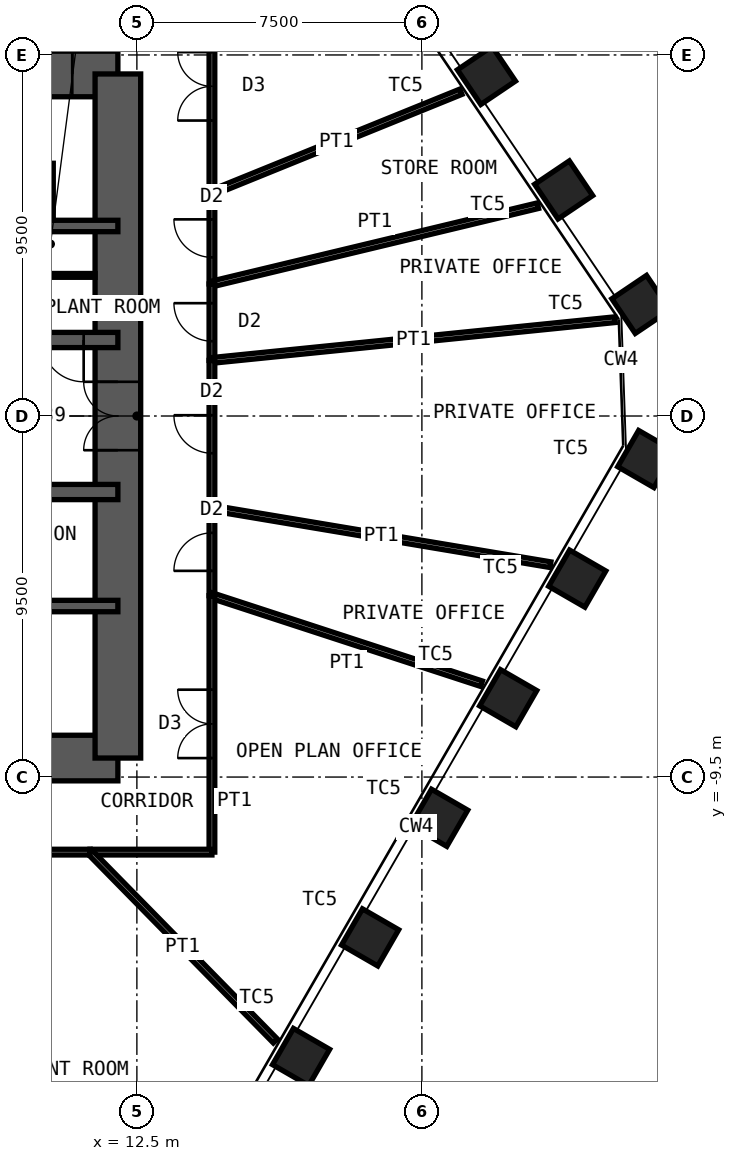
"""IFC4 building model, lengths in metres.
Left out: names, types, materials, properties, quantities, classifications, styles, units other than length and angle.
Written with IfcOpenShell. Run it as: python <this file> out.ifc"""

import sys

from ifc_helpers import new_model, si_unit, direction, frame, frame_2d, origin, origin_2d, place, context, subcontext, project, spatial, rectangle, hollow_rectangle, extrude, element, fill, save


model = new_model("IFC4")
c1 = context("Model", 3, precision=1e-05, world=origin(), true_north=direction((0.0, 1.0)))
c2 = subcontext(c1, "Body", "Model", "MODEL_VIEW")
j1 = project(units=[si_unit("LENGTHUNIT", "METRE"), si_unit("PLANEANGLEUNIT", "RADIAN")], contexts=[c1])
p1 = place(None, origin())
s1 = spatial("IfcSite", under=j1, at=p1, CompositionType="ELEMENT")
p2 = place(p1, origin())
s2 = spatial("IfcBuilding", under=s1, at=p2, CompositionType="ELEMENT")
p3 = place(p2, frame((0.0, 0.0, 205.6)))
s3 = spatial("IfcBuildingStorey", under=s2, at=p3, CompositionType="ELEMENT", Elevation=205.6)
for number, where, z_axis, x_axis in (
    (1, (21.699, 8.961, 0.0), (0.0, 0.0, 1.0), (-0.559, 0.829, 0.0)),
    (2, (23.731, 5.948, 0.0), (0.0, 0.0, 1.0), (-0.559, 0.829, 0.0)),
    (3, (25.762, 2.936, 0.0), (0.0, 0.0, 1.0), (-0.559, 0.829, 0.0)),
    (4, (25.905, -1.132, 0.0), (0.0, 0.0, 1.0), (0.5, 0.866, 0.0)),
    (5, (24.088, -4.279, 0.0), (0.0, 0.0, 1.0), (0.5, 0.866, 0.0)),
    (6, (22.271, -7.426, 0.0), (0.0, 0.0, 1.0), (0.5, 0.866, 0.0)),
    (7, (20.454, -10.572, 0.0), (0.0, 0.0, 1.0), (0.5, 0.866, 0.0)),
    (8, (18.637, -13.719, 0.0), (0.0, 0.0, 1.0), (0.5, 0.866, 0.0)),
    (9, (16.821, -16.866, 0.0), (0.0, 0.0, 1.0), (0.5, 0.866, 0.0)),
):
    element("IfcColumn", number, at=place(p3, frame(where, z_axis=z_axis, x_axis=x_axis)), inside=s3, PredefinedType="COLUMN", context=c2, shape_type="SweptSolid", body=[
        extrude(hollow_rectangle(XDim=1.1, YDim=1.1, WallThickness=0.07, at=origin_2d()), origin(), (0.0, 0.0, 1.0), 4.2),
    ])
p4 = place(p3, frame((-12.0, 9.0, 0.0), z_axis=(0.0, 0.0, 1.0), x_axis=(1.0, 0.0, 0.0)))
e10 = element("IfcWall", 10, at=p4, inside=s3, PredefinedType="SHEAR", context=c2, shape_type="SweptSolid", body=[
    extrude(rectangle(XDim=24.0, YDim=1.2, at=frame_2d((12.0, 0.0))), origin(), (0.0, 0.0, 1.0), 4.2),
])
p5 = place(p4, frame((10.4, 0.0, 0.0)))
e11 = element("IfcOpeningElement", 11, at=p5, cuts=e10, PredefinedType="OPENING", context=c2, shape_type="SweptSolid", body=[
    extrude(rectangle(XDim=1.0, YDim=2.1, at=frame_2d((0.5, 1.05))), frame((0.0, 0.61, 0.0), z_axis=(0.0, -1.0, 0.0), x_axis=(1.0, 0.0, 0.0)), (0.0, 0.0, 1.0), 1.22),
])
p6 = place(p4, frame((17.6, 0.0, 0.0)))
e12 = element("IfcOpeningElement", 12, at=p6, cuts=e10, PredefinedType="OPENING", context=c2, shape_type="SweptSolid", body=[
    extrude(rectangle(XDim=0.9, YDim=2.1, at=frame_2d((0.45, 1.05))), frame((0.0, 0.61, 0.0), z_axis=(0.0, -1.0, 0.0), x_axis=(1.0, 0.0, 0.0)), (0.0, 0.0, 1.0), 1.22),
])
p7 = place(p4, frame((21.9, 0.0, 0.0)))
e13 = element("IfcOpeningElement", 13, at=p7, cuts=e10, PredefinedType="OPENING", context=c2, shape_type="SweptSolid", body=[
    extrude(rectangle(XDim=0.9, YDim=2.1, at=frame_2d((0.45, 1.05))), frame((0.0, 0.61, 0.0), z_axis=(0.0, -1.0, 0.0), x_axis=(1.0, 0.0, 0.0)), (0.0, 0.0, 1.0), 1.22),
])
p8 = place(p3, frame((-12.0, -9.0, 0.0), z_axis=(0.0, 0.0, 1.0), x_axis=(1.0, 0.0, 0.0)))
e14 = element("IfcWall", 14, at=p8, inside=s3, PredefinedType="SHEAR", context=c2, shape_type="SweptSolid", body=[
    extrude(rectangle(XDim=24.0, YDim=1.2, at=frame_2d((12.0, 0.0))), origin(), (0.0, 0.0, 1.0), 4.2),
])
p9 = place(p8, frame((1.35, 0.0, 0.0)))
e15 = element("IfcOpeningElement", 15, at=p9, cuts=e14, PredefinedType="OPENING", context=c2, shape_type="SweptSolid", body=[
    extrude(rectangle(XDim=1.0, YDim=2.1, at=frame_2d((0.5, 1.05))), frame((0.0, 0.61, 0.0), z_axis=(0.0, -1.0, 0.0), x_axis=(1.0, 0.0, 0.0)), (0.0, 0.0, 1.0), 1.22),
])
p10 = place(p8, frame((5.325, 0.0, 0.0)))
e16 = element("IfcOpeningElement", 16, at=p10, cuts=e14, PredefinedType="OPENING", context=c2, shape_type="SweptSolid", body=[
    extrude(rectangle(XDim=1.15, YDim=2.1, at=frame_2d((0.575, 1.05))), frame((0.0, 0.61, 0.0), z_axis=(0.0, -1.0, 0.0), x_axis=(1.0, 0.0, 0.0)), (0.0, 0.0, 1.0), 1.22),
])
p11 = place(p8, frame((12.6, 0.0, 0.0)))
e17 = element("IfcOpeningElement", 17, at=p11, cuts=e14, PredefinedType="OPENING", context=c2, shape_type="SweptSolid", body=[
    extrude(rectangle(XDim=1.0, YDim=2.1, at=frame_2d((0.5, 1.05))), frame((0.0, 0.61, 0.0), z_axis=(0.0, -1.0, 0.0), x_axis=(1.0, 0.0, 0.0)), (0.0, 0.0, 1.0), 1.22),
])
p12 = place(p3, frame((12.0, -9.0, 0.0), z_axis=(0.0, 0.0, 1.0), x_axis=(0.0, 1.0, 0.0)))
e18 = element("IfcWall", 18, at=p12, inside=s3, PredefinedType="SHEAR", context=c2, shape_type="SweptSolid", body=[
    extrude(rectangle(XDim=18.0, YDim=1.2, at=frame_2d((9.0, 0.0))), origin(), (0.0, 0.0, 1.0), 4.2),
])
p13 = place(p12, frame((8.1, 0.0, 0.0)))
e19 = element("IfcOpeningElement", 19, at=p13, cuts=e18, PredefinedType="OPENING", context=c2, shape_type="SweptSolid", body=[
    extrude(rectangle(XDim=1.8, YDim=2.1, at=frame_2d((0.9, 1.05))), frame((0.0, 0.61, 0.0), z_axis=(0.0, -1.0, 0.0), x_axis=(1.0, 0.0, 0.0)), (0.0, 0.0, 1.0), 1.22),
])
p14 = place(p3, frame((-12.0, 5.0, 0.0), z_axis=(0.0, 0.0, 1.0), x_axis=(1.0, 0.0, 0.0)))
e20 = element("IfcWall", 20, at=p14, inside=s3, PredefinedType="SHEAR", context=c2, shape_type="SweptSolid", body=[
    extrude(rectangle(XDim=24.0, YDim=0.3, at=frame_2d((12.0, 0.0))), origin(), (0.0, 0.0, 1.0), 4.2),
])
p15 = place(p3, frame((-12.0, 2.0, 0.0), z_axis=(0.0, 0.0, 1.0), x_axis=(1.0, 0.0, 0.0)))
e21 = element("IfcWall", 21, at=p15, inside=s3, PredefinedType="SHEAR", context=c2, shape_type="SweptSolid", body=[
    extrude(rectangle(XDim=24.0, YDim=0.4, at=frame_2d((12.0, 0.0))), origin(), (0.0, 0.0, 1.0), 4.2),
])
p16 = place(p15, frame((2.4, 0.0, 0.0)))
e22 = element("IfcOpeningElement", 22, at=p16, cuts=e21, PredefinedType="OPENING", context=c2, shape_type="SweptSolid", body=[
    extrude(rectangle(XDim=1.1, YDim=2.1, at=frame_2d((0.55, 1.05))), frame((0.0, 0.21, 0.0), z_axis=(0.0, -1.0, 0.0), x_axis=(1.0, 0.0, 0.0)), (0.0, 0.0, 1.0), 0.42),
])
p17 = place(p15, frame((22.0, 0.0, 0.0)))
e23 = element("IfcOpeningElement", 23, at=p17, cuts=e21, PredefinedType="OPENING", context=c2, shape_type="SweptSolid", body=[
    extrude(rectangle(XDim=1.1, YDim=2.1, at=frame_2d((0.55, 1.05))), frame((0.0, 0.21, 0.0), z_axis=(0.0, -1.0, 0.0), x_axis=(1.0, 0.0, 0.0)), (0.0, 0.0, 1.0), 0.42),
])
p18 = place(p15, frame((10.15, 0.0, 0.0)))
e24 = element("IfcOpeningElement", 24, at=p18, cuts=e21, PredefinedType="OPENING", context=c2, shape_type="SweptSolid", body=[
    extrude(rectangle(XDim=1.0, YDim=2.1, at=frame_2d((0.5, 1.05))), frame((0.0, 0.21, 0.0), z_axis=(0.0, -1.0, 0.0), x_axis=(1.0, 0.0, 0.0)), (0.0, 0.0, 1.0), 0.42),
])
p19 = place(p15, frame((6.9, 0.0, 0.0)))
e25 = element("IfcOpeningElement", 25, at=p19, cuts=e21, PredefinedType="OPENING", context=c2, shape_type="SweptSolid", body=[
    extrude(rectangle(XDim=1.0, YDim=2.1, at=frame_2d((0.5, 1.05))), frame((0.0, 0.21, 0.0), z_axis=(0.0, -1.0, 0.0), x_axis=(1.0, 0.0, 0.0)), (0.0, 0.0, 1.0), 0.42),
])
p20 = place(p15, frame((13.35, 0.0, 0.0)))
e26 = element("IfcOpeningElement", 26, at=p20, cuts=e21, PredefinedType="OPENING", context=c2, shape_type="SweptSolid", body=[
    extrude(rectangle(XDim=1.1, YDim=2.4, at=frame_2d((0.55, 1.2))), frame((0.0, 0.21, 0.0), z_axis=(0.0, -1.0, 0.0), x_axis=(1.0, 0.0, 0.0)), (0.0, 0.0, 1.0), 0.42),
])
p21 = place(p15, frame((16.15, 0.0, 0.0)))
e27 = element("IfcOpeningElement", 27, at=p21, cuts=e21, PredefinedType="OPENING", context=c2, shape_type="SweptSolid", body=[
    extrude(rectangle(XDim=1.1, YDim=2.4, at=frame_2d((0.55, 1.2))), frame((0.0, 0.21, 0.0), z_axis=(0.0, -1.0, 0.0), x_axis=(1.0, 0.0, 0.0)), (0.0, 0.0, 1.0), 0.42),
])
p22 = place(p15, frame((18.95, 0.0, 0.0)))
e28 = element("IfcOpeningElement", 28, at=p22, cuts=e21, PredefinedType="OPENING", context=c2, shape_type="SweptSolid", body=[
    extrude(rectangle(XDim=1.1, YDim=2.4, at=frame_2d((0.55, 1.2))), frame((0.0, 0.21, 0.0), z_axis=(0.0, -1.0, 0.0), x_axis=(1.0, 0.0, 0.0)), (0.0, 0.0, 1.0), 0.42),
])
p23 = place(p3, frame((-12.0, -2.0, 0.0), z_axis=(0.0, 0.0, 1.0), x_axis=(1.0, 0.0, 0.0)))
e29 = element("IfcWall", 29, at=p23, inside=s3, PredefinedType="SHEAR", context=c2, shape_type="SweptSolid", body=[
    extrude(rectangle(XDim=24.0, YDim=0.4, at=frame_2d((12.0, 0.0))), origin(), (0.0, 0.0, 1.0), 4.2),
])
p24 = place(p23, frame((1.1, 0.0, 0.0)))
e30 = element("IfcOpeningElement", 30, at=p24, cuts=e29, PredefinedType="OPENING", context=c2, shape_type="SweptSolid", body=[
    extrude(rectangle(XDim=1.1, YDim=2.1, at=frame_2d((0.55, 1.05))), frame((0.0, 0.21, 0.0), z_axis=(0.0, -1.0, 0.0), x_axis=(1.0, 0.0, 0.0)), (0.0, 0.0, 1.0), 0.42),
])
p25 = place(p23, frame((13.55, 0.0, 0.0)))
e31 = element("IfcOpeningElement", 31, at=p25, cuts=e29, PredefinedType="OPENING", context=c2, shape_type="SweptSolid", body=[
    extrude(rectangle(XDim=1.1, YDim=2.1, at=frame_2d((0.55, 1.05))), frame((0.0, 0.21, 0.0), z_axis=(0.0, -1.0, 0.0), x_axis=(1.0, 0.0, 0.0)), (0.0, 0.0, 1.0), 0.42),
])
p26 = place(p23, frame((20.7, 0.0, 0.0)))
e32 = element("IfcOpeningElement", 32, at=p26, cuts=e29, PredefinedType="OPENING", context=c2, shape_type="SweptSolid", body=[
    extrude(rectangle(XDim=1.1, YDim=2.1, at=frame_2d((0.55, 1.05))), frame((0.0, 0.21, 0.0), z_axis=(0.0, -1.0, 0.0), x_axis=(1.0, 0.0, 0.0)), (0.0, 0.0, 1.0), 0.42),
])
p27 = place(p23, frame((4.0, 0.0, 0.0)))
e33 = element("IfcOpeningElement", 33, at=p27, cuts=e29, PredefinedType="OPENING", context=c2, shape_type="SweptSolid", body=[
    extrude(rectangle(XDim=1.0, YDim=2.1, at=frame_2d((0.5, 1.05))), frame((0.0, 0.21, 0.0), z_axis=(0.0, -1.0, 0.0), x_axis=(1.0, 0.0, 0.0)), (0.0, 0.0, 1.0), 0.42),
])
p28 = place(p23, frame((6.8, 0.0, 0.0)))
e34 = element("IfcOpeningElement", 34, at=p28, cuts=e29, PredefinedType="OPENING", context=c2, shape_type="SweptSolid", body=[
    extrude(rectangle(XDim=1.0, YDim=2.1, at=frame_2d((0.5, 1.05))), frame((0.0, 0.21, 0.0), z_axis=(0.0, -1.0, 0.0), x_axis=(1.0, 0.0, 0.0)), (0.0, 0.0, 1.0), 0.42),
])
p29 = place(p3, frame((-12.0, -5.0, 0.0), z_axis=(0.0, 0.0, 1.0), x_axis=(1.0, 0.0, 0.0)))
e35 = element("IfcWall", 35, at=p29, inside=s3, PredefinedType="SHEAR", context=c2, shape_type="SweptSolid", body=[
    extrude(rectangle(XDim=24.0, YDim=0.3, at=frame_2d((12.0, 0.0))), origin(), (0.0, 0.0, 1.0), 4.2),
])
p30 = place(p3, frame((9.05, 3.7, 0.0), z_axis=(0.0, 0.0, 1.0), x_axis=(1.0, 0.0, 0.0)))
e36 = element("IfcWall", 36, at=p30, inside=s3, PredefinedType="PARTITIONING", context=c2, shape_type="SweptSolid", body=[
    extrude(rectangle(XDim=2.35, YDim=0.1, at=frame_2d((1.175, 0.0))), origin(), (0.0, 0.0, 1.0), 3.98),
])
p31 = place(p30, frame((0.1, 0.0, 0.0)))
e37 = element("IfcOpeningElement", 37, at=p31, cuts=e36, PredefinedType="OPENING", context=c2, shape_type="SweptSolid", body=[
    extrude(rectangle(XDim=1.0, YDim=2.4, at=frame_2d((0.5, 1.2))), frame((0.0, 0.06, 0.0), z_axis=(0.0, -1.0, 0.0), x_axis=(1.0, 0.0, 0.0)), (0.0, 0.0, 1.0), 0.12),
])
p32 = place(p3, frame((10.25, 5.15, 0.0), z_axis=(0.0, 0.0, 1.0), x_axis=(0.0, 1.0, 0.0)))
e38 = element("IfcWall", 38, at=p32, inside=s3, PredefinedType="PARTITIONING", context=c2, shape_type="SweptSolid", body=[
    extrude(rectangle(XDim=1.5, YDim=0.1, at=frame_2d((0.75, 0.0))), origin(), (0.0, 0.0, 1.0), 2.1),
])
p33 = place(p3, frame((14.475, 11.475, 0.0), z_axis=(0.0, 0.0, 1.0), x_axis=(0.0, -1.0, 0.0)))
e39 = element("IfcWall", 39, at=p33, inside=s3, PredefinedType="PARTITIONING", context=c2, shape_type="SweptSolid", body=[
    extrude(rectangle(XDim=5.601, YDim=0.15, at=frame_2d((2.801, 0.0))), origin(), (0.0, 0.0, 1.0), 4.03),
])
p34 = place(p33, frame((1.901, 0.0, 0.0)))
e40 = element("IfcOpeningElement", 40, at=p34, cuts=e39, PredefinedType="OPENING", context=c2, shape_type="SweptSolid", body=[
    extrude(rectangle(XDim=1.8, YDim=2.4, at=frame_2d((0.9, 1.2))), frame((0.0, 0.085, 0.0), z_axis=(0.0, -1.0, 0.0), x_axis=(1.0, 0.0, 0.0)), (0.0, 0.0, 1.0), 0.17),
])
p35 = place(p3, frame((21.026, 8.532, 0.0), z_axis=(0.0, 0.0, 1.0), x_axis=(-0.926617028548, -0.376006492503, 0.0)))
e41 = element("IfcWall", 41, at=p35, inside=s3, PredefinedType="PARTITIONING", context=c2, shape_type="SweptSolid", body=[
    extrude(rectangle(XDim=7.07, YDim=0.15, at=frame_2d((3.535, 0.0))), origin(), (0.0, 0.0, 1.0), 3.43),
])
p36 = place(p3, frame((14.475, 5.874, 0.0), z_axis=(0.0, 0.0, 1.0), x_axis=(0.0, -1.0, 0.0)))
e42 = element("IfcWall", 42, at=p36, inside=s3, PredefinedType="PARTITIONING", context=c2, shape_type="SweptSolid", body=[
    extrude(rectangle(XDim=2.399, YDim=0.15, at=frame_2d((1.2, 0.0))), origin(), (0.0, 0.0, 1.0), 4.03),
])
p37 = place(p36, frame((0.699, 0.0, 0.0)))
e43 = element("IfcOpeningElement", 43, at=p37, cuts=e42, PredefinedType="OPENING", context=c2, shape_type="SweptSolid", body=[
    extrude(rectangle(XDim=1.0, YDim=2.4, at=frame_2d((0.5, 1.2))), frame((0.0, 0.085, 0.0), z_axis=(0.0, -1.0, 0.0), x_axis=(1.0, 0.0, 0.0)), (0.0, 0.0, 1.0), 0.17),
])
p38 = place(p3, frame((23.053, 5.534, 0.0), z_axis=(0.0, 0.0, 1.0), x_axis=(-0.972377252501, -0.233414821335, 0.0)))
e44 = element("IfcWall", 44, at=p38, inside=s3, PredefinedType="PARTITIONING", context=c2, shape_type="SweptSolid", body=[
    extrude(rectangle(XDim=8.822, YDim=0.15, at=frame_2d((4.411, 0.0))), origin(), (0.0, 0.0, 1.0), 3.43),
])
p39 = place(p3, frame((14.475, 3.475, 0.0), z_axis=(0.0, 0.0, 1.0), x_axis=(0.0, -1.0, 0.0)))
e45 = element("IfcWall", 45, at=p39, inside=s3, PredefinedType="PARTITIONING", context=c2, shape_type="SweptSolid", body=[
    extrude(rectangle(XDim=2.012, YDim=0.15, at=frame_2d((1.006, 0.0))), origin(), (0.0, 0.0, 1.0), 4.03),
])
p40 = place(p39, frame((0.506, 0.0, 0.0)))
e46 = element("IfcOpeningElement", 46, at=p40, cuts=e45, PredefinedType="OPENING", context=c2, shape_type="SweptSolid", body=[
    extrude(rectangle(XDim=1.0, YDim=2.4, at=frame_2d((0.5, 1.2))), frame((0.0, 0.085, 0.0), z_axis=(0.0, -1.0, 0.0), x_axis=(1.0, 0.0, 0.0)), (0.0, 0.0, 1.0), 0.17),
])
p41 = place(p3, frame((25.083, 2.535, 0.0), z_axis=(0.0, 0.0, 1.0), x_axis=(-0.994932122767, -0.10054884925, 0.0)))
e47 = element("IfcWall", 47, at=p41, inside=s3, PredefinedType="PARTITIONING", context=c2, shape_type="SweptSolid", body=[
    extrude(rectangle(XDim=10.662, YDim=0.15, at=frame_2d((5.331, 0.0))), origin(), (0.0, 0.0, 1.0), 2.93),
])
p42 = place(p3, frame((14.475, 1.463, 0.0), z_axis=(0.0, 0.0, 1.0), x_axis=(0.0, -1.0, 0.0)))
e48 = element("IfcWall", 48, at=p42, inside=s3, PredefinedType="PARTITIONING", context=c2, shape_type="SweptSolid", body=[
    extrude(rectangle(XDim=3.885, YDim=0.15, at=frame_2d((1.942, 0.0))), origin(), (0.0, 0.0, 1.0), 4.03),
])
p43 = place(p42, frame((1.442, 0.0, 0.0)))
e49 = element("IfcOpeningElement", 49, at=p43, cuts=e48, PredefinedType="OPENING", context=c2, shape_type="SweptSolid", body=[
    extrude(rectangle(XDim=1.0, YDim=2.4, at=frame_2d((0.5, 1.2))), frame((0.0, 0.085, 0.0), z_axis=(0.0, -1.0, 0.0), x_axis=(1.0, 0.0, 0.0)), (0.0, 0.0, 1.0), 0.17),
])
p44 = place(p3, frame((23.383, -3.912, 0.0), z_axis=(0.0, 0.0, 1.0), x_axis=(-0.986293651891, 0.164999491631, 0.0)))
e50 = element("IfcWall", 50, at=p44, inside=s3, PredefinedType="PARTITIONING", context=c2, shape_type="SweptSolid", body=[
    extrude(rectangle(XDim=9.032, YDim=0.15, at=frame_2d((4.516, 0.0))), origin(), (0.0, 0.0, 1.0), 3.43),
])
p45 = place(p3, frame((14.475, -2.422, 0.0), z_axis=(0.0, 0.0, 1.0), x_axis=(0.0, -1.0, 0.0)))
e51 = element("IfcWall", 51, at=p45, inside=s3, PredefinedType="PARTITIONING", context=c2, shape_type="SweptSolid", body=[
    extrude(rectangle(XDim=2.305, YDim=0.15, at=frame_2d((1.153, 0.0))), origin(), (0.0, 0.0, 1.0), 4.03),
])
p46 = place(p45, frame((0.653, 0.0, 0.0)))
e52 = element("IfcOpeningElement", 52, at=p46, cuts=e51, PredefinedType="OPENING", context=c2, shape_type="SweptSolid", body=[
    extrude(rectangle(XDim=1.0, YDim=2.4, at=frame_2d((0.5, 1.2))), frame((0.0, 0.085, 0.0), z_axis=(0.0, -1.0, 0.0), x_axis=(1.0, 0.0, 0.0)), (0.0, 0.0, 1.0), 0.17),
])
p47 = place(p3, frame((21.57, -7.044, 0.0), z_axis=(0.0, 0.0, 1.0), x_axis=(-0.950585953502, 0.310461503258, 0.0)))
e53 = element("IfcWall", 53, at=p47, inside=s3, PredefinedType="PARTITIONING", context=c2, shape_type="SweptSolid", body=[
    extrude(rectangle(XDim=7.464, YDim=0.15, at=frame_2d((3.732, 0.0))), origin(), (0.0, 0.0, 1.0), 3.43),
])
p48 = place(p3, frame((14.475, -4.727, 0.0), z_axis=(0.0, 0.0, 1.0), x_axis=(0.0, -1.0, 0.0)))
e54 = element("IfcWall", 54, at=p48, inside=s3, PredefinedType="PARTITIONING", context=c2, shape_type="SweptSolid", body=[
    extrude(rectangle(XDim=6.748, YDim=0.15, at=frame_2d((3.374, 0.0))), origin(), (0.0, 0.0, 1.0), 4.03),
])
p49 = place(p48, frame((2.474, 0.0, 0.0)))
e55 = element("IfcOpeningElement", 55, at=p49, cuts=e54, PredefinedType="OPENING", context=c2, shape_type="SweptSolid", body=[
    extrude(rectangle(XDim=1.8, YDim=2.4, at=frame_2d((0.9, 1.2))), frame((0.0, 0.085, 0.0), z_axis=(0.0, -1.0, 0.0), x_axis=(1.0, 0.0, 0.0)), (0.0, 0.0, 1.0), 0.17),
])
p50 = place(p3, frame((14.475, -11.475, 0.0), z_axis=(0.0, 0.0, 1.0), x_axis=(-1.0, 0.0, 0.0)))
e56 = element("IfcWall", 56, at=p50, inside=s3, PredefinedType="PARTITIONING", context=c2, shape_type="SweptSolid", body=[
    extrude(rectangle(XDim=3.209, YDim=0.15, at=frame_2d((1.605, 0.0))), origin(), (0.0, 0.0, 1.0), 4.03),
])
p51 = place(p3, frame((16.145, -16.444, 0.0), z_axis=(0.0, 0.0, 1.0), x_axis=(-0.700591378209, 0.71356269576, 0.0)))
e57 = element("IfcWall", 57, at=p51, inside=s3, PredefinedType="PARTITIONING", context=c2, shape_type="SweptSolid", body=[
    extrude(rectangle(XDim=6.964, YDim=0.15, at=frame_2d((3.482, 0.0))), origin(), (0.0, 0.0, 1.0), 3.43),
])
p52 = place(p3, frame((11.266, -11.475, 0.0), z_axis=(0.0, 0.0, 1.0), x_axis=(-1.0, 0.0, 0.0)))
e58 = element("IfcWall", 58, at=p52, inside=s3, PredefinedType="PARTITIONING", context=c2, shape_type="SweptSolid", body=[
    extrude(rectangle(XDim=7.196, YDim=0.15, at=frame_2d((3.598, 0.0))), origin(), (0.0, 0.0, 1.0), 4.03),
])
p53 = place(p52, frame((3.098, 0.0, 0.0)))
e59 = element("IfcOpeningElement", 59, at=p53, cuts=e58, PredefinedType="OPENING", context=c2, shape_type="SweptSolid", body=[
    extrude(rectangle(XDim=1.0, YDim=2.4, at=frame_2d((0.5, 1.2))), frame((0.0, 0.085, 0.0), z_axis=(0.0, -1.0, 0.0), x_axis=(1.0, 0.0, 0.0)), (0.0, 0.0, 1.0), 0.17),
])
p54 = place(p7, origin())
e60 = element("IfcDoor", 60, at=p54, inside=s3, OperationType="SINGLE_SWING_LEFT", PredefinedType="DOOR", context=c2, shape_type="SweptSolid", body=[
    extrude(rectangle(XDim=0.9, YDim=2.1, at=frame_2d((0.45, 1.05))), frame((0.0, 0.025, 0.0), z_axis=(0.0, -1.0, 0.0), x_axis=(1.0, 0.0, 0.0)), (0.0, 0.0, 1.0), 0.05),
])
fill(e13, e60)
p55 = place(p17, origin())
e61 = element("IfcDoor", 61, at=p55, inside=s3, OperationType="SINGLE_SWING_RIGHT", PredefinedType="DOOR", context=c2, shape_type="SweptSolid", body=[
    extrude(rectangle(XDim=1.1, YDim=2.1, at=frame_2d((0.55, 1.05))), frame((0.0, 0.025, 0.0), z_axis=(0.0, -1.0, 0.0), x_axis=(1.0, 0.0, 0.0)), (0.0, 0.0, 1.0), 0.05),
])
fill(e23, e61)
p56 = place(p13, origin())
e62 = element("IfcDoor", 62, at=p56, inside=s3, OperationType="DOUBLE_DOOR_DOUBLE_SWING", PredefinedType="DOOR", context=c2, shape_type="SweptSolid", body=[
    extrude(rectangle(XDim=1.8, YDim=2.1, at=frame_2d((0.9, 1.05))), frame((0.0, 0.025, 0.0), z_axis=(0.0, -1.0, 0.0), x_axis=(1.0, 0.0, 0.0)), (0.0, 0.0, 1.0), 0.05),
])
fill(e19, e62)
p57 = place(p34, origin())
e63 = element("IfcDoor", 63, at=p57, inside=s3, OperationType="DOUBLE_DOOR_DOUBLE_SWING", PredefinedType="DOOR", context=c2, shape_type="SweptSolid", body=[
    extrude(rectangle(XDim=1.8, YDim=2.4, at=frame_2d((0.9, 1.2))), frame((0.0, 0.025, 0.0), z_axis=(0.0, -1.0, 0.0), x_axis=(1.0, 0.0, 0.0)), (0.0, 0.0, 1.0), 0.05),
])
fill(e40, e63)
p58 = place(p37, origin())
e64 = element("IfcDoor", 64, at=p58, inside=s3, OperationType="SINGLE_SWING_LEFT", PredefinedType="DOOR", context=c2, shape_type="SweptSolid", body=[
    extrude(rectangle(XDim=1.0, YDim=2.4, at=frame_2d((0.5, 1.2))), frame((0.0, 0.025, 0.0), z_axis=(0.0, -1.0, 0.0), x_axis=(1.0, 0.0, 0.0)), (0.0, 0.0, 1.0), 0.05),
])
fill(e43, e64)
p59 = place(p40, origin())
e65 = element("IfcDoor", 65, at=p59, inside=s3, OperationType="SINGLE_SWING_LEFT", PredefinedType="DOOR", context=c2, shape_type="SweptSolid", body=[
    extrude(rectangle(XDim=1.0, YDim=2.4, at=frame_2d((0.5, 1.2))), frame((0.0, 0.025, 0.0), z_axis=(0.0, -1.0, 0.0), x_axis=(1.0, 0.0, 0.0)), (0.0, 0.0, 1.0), 0.05),
])
fill(e46, e65)
p60 = place(p43, origin())
e66 = element("IfcDoor", 66, at=p60, inside=s3, OperationType="SINGLE_SWING_LEFT", PredefinedType="DOOR", context=c2, shape_type="SweptSolid", body=[
    extrude(rectangle(XDim=1.0, YDim=2.4, at=frame_2d((0.5, 1.2))), frame((0.0, 0.025, 0.0), z_axis=(0.0, -1.0, 0.0), x_axis=(1.0, 0.0, 0.0)), (0.0, 0.0, 1.0), 0.05),
])
fill(e49, e66)
p61 = place(p46, origin())
e67 = element("IfcDoor", 67, at=p61, inside=s3, OperationType="SINGLE_SWING_RIGHT", PredefinedType="DOOR", context=c2, shape_type="SweptSolid", body=[
    extrude(rectangle(XDim=1.0, YDim=2.4, at=frame_2d((0.5, 1.2))), frame((0.0, 0.025, 0.0), z_axis=(0.0, -1.0, 0.0), x_axis=(1.0, 0.0, 0.0)), (0.0, 0.0, 1.0), 0.05),
])
fill(e52, e67)
p62 = place(p49, origin())
e68 = element("IfcDoor", 68, at=p62, inside=s3, OperationType="DOUBLE_DOOR_DOUBLE_SWING", PredefinedType="DOOR", context=c2, shape_type="SweptSolid", body=[
    extrude(rectangle(XDim=1.8, YDim=2.4, at=frame_2d((0.9, 1.2))), frame((0.0, 0.025, 0.0), z_axis=(0.0, -1.0, 0.0), x_axis=(1.0, 0.0, 0.0)), (0.0, 0.0, 1.0), 0.05),
])
fill(e55, e68)
save(model, sys.argv[1])
